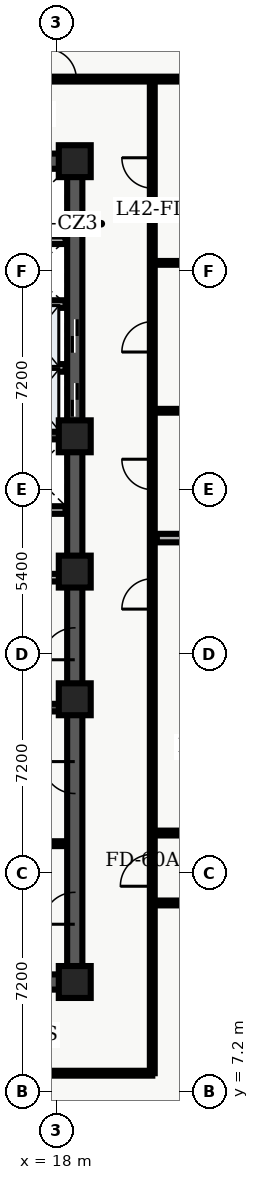
"""IFC4 building model, lengths in metres.
Left out: names, types, materials, properties, quantities, classifications, styles, units other than length and angle.
Written with IfcOpenShell. Run it as: python <this file> out.ifc"""

import sys

from ifc_helpers import new_model, entity, si_unit, converted_unit, direction, frame, origin_with_axes, origin_2d_with_axis, place, context, subcontext, project, spatial, polyline, rectangle, outline, extrude, element, fill, save


model = new_model("IFC4")
c1 = context("Model", 3, precision=1e-05, world=origin_with_axes(), true_north=direction((0.0, 1.0)))
c2 = subcontext(c1, "Body", "Model", "MODEL_VIEW")
j1 = project(units=[si_unit("LENGTHUNIT", "METRE"), converted_unit("PLANEANGLEUNIT", "DEGREE", entity("IfcPlaneAngleMeasure", 0.017), si_unit("PLANEANGLEUNIT", "RADIAN"), dimensions=[0, 0, 0, 0, 0, 0, 0])], contexts=[c1])
p1 = place(None, origin_with_axes())
s1 = spatial("IfcSite", under=j1, at=p1, CompositionType="ELEMENT")
p2 = place(p1, origin_with_axes())
s2 = spatial("IfcBuilding", under=s1, at=p2, CompositionType="ELEMENT")
p3 = place(p2, frame((0.0, 0.0, 171.9), z_axis=(0.0, 0.0, 1.0), x_axis=(1.0, 0.0, 0.0)))
s3 = spatial("IfcBuildingStorey", under=s2, at=p3, CompositionType="ELEMENT", Elevation=171.9)
p4 = place(p3, frame((11.4, 10.8, 0.0), z_axis=(0.0, 0.0, 1.0), x_axis=(1.0, 0.0, 0.0)))
e1 = element("IfcWall", 1, at=p4, inside=s3, PredefinedType="SHEAR", context=c2, shape_type="SweptSolid", body=[
    extrude(outline(polyline([(0.0, -0.25), (7.2, -0.25), (7.2, 0.25), (0.0, 0.25), (0.0, -0.25)])), origin_with_axes(), (0.0, 0.0, 1.0), 3.66),
])
p5 = place(p4, frame((2.625, 0.0, 0.0), z_axis=(0.0, 0.0, 1.0), x_axis=(1.0, 0.0, 0.0)))
e2 = element("IfcOpeningElement", 2, at=p5, cuts=e1, PredefinedType="OPENING", context=c2, shape_type="SweptSolid", body=[
    extrude(rectangle(XDim=1.05, YDim=0.52, at=origin_2d_with_axis()), origin_with_axes(), (0.0, 0.0, 1.0), 2.15),
])
p6 = place(p3, frame((11.4, 37.8, 0.0), z_axis=(0.0, 0.0, 1.0), x_axis=(1.0, 0.0, 0.0)))
e3 = element("IfcWall", 3, at=p6, inside=s3, PredefinedType="SHEAR", context=c2, shape_type="SweptSolid", body=[
    extrude(outline(polyline([(0.0, -0.25), (7.2, -0.25), (7.2, 0.25), (0.0, 0.25), (0.0, -0.25)])), origin_with_axes(), (0.0, 0.0, 1.0), 3.66),
])
p7 = place(p6, frame((2.625, 0.0, 0.0), z_axis=(0.0, 0.0, 1.0), x_axis=(1.0, 0.0, 0.0)))
e4 = element("IfcOpeningElement", 4, at=p7, cuts=e3, PredefinedType="OPENING", context=c2, shape_type="SweptSolid", body=[
    extrude(rectangle(XDim=1.05, YDim=0.52, at=origin_2d_with_axis()), origin_with_axes(), (0.0, 0.0, 1.0), 2.15),
])
p8 = place(p3, frame((18.6, 10.8, 0.0), z_axis=(0.0, 0.0, 1.0), x_axis=(0.0, 1.0, 0.0)))
e5 = element("IfcWall", 5, at=p8, inside=s3, PredefinedType="SHEAR", context=c2, shape_type="SweptSolid", body=[
    extrude(outline(polyline([(0.0, -0.25), (13.5, -0.25), (13.5, 0.25), (0.0, 0.25), (0.0, -0.25)])), origin_with_axes(), (0.0, 0.0, 1.0), 3.66),
])
p9 = place(p8, frame((11.125, 0.0, 0.0), z_axis=(0.0, 0.0, 1.0), x_axis=(1.0, 0.0, 0.0)))
e6 = element("IfcOpeningElement", 6, at=p9, cuts=e5, PredefinedType="OPENING", context=c2, shape_type="SweptSolid", body=[
    extrude(rectangle(XDim=1.05, YDim=0.52, at=origin_2d_with_axis()), origin_with_axes(), (0.0, 0.0, 1.0), 2.15),
])
p10 = place(p8, frame((2.425, 0.0, 0.0), z_axis=(0.0, 0.0, 1.0), x_axis=(1.0, 0.0, 0.0)))
e7 = element("IfcOpeningElement", 7, at=p10, cuts=e5, PredefinedType="OPENING", context=c2, shape_type="SweptSolid", body=[
    extrude(rectangle(XDim=1.05, YDim=0.52, at=origin_2d_with_axis()), origin_with_axes(), (0.0, 0.0, 1.0), 2.15),
])
p11 = place(p8, frame((6.725, 0.0, 0.0), z_axis=(0.0, 0.0, 1.0), x_axis=(1.0, 0.0, 0.0)))
e8 = element("IfcOpeningElement", 8, at=p11, cuts=e5, PredefinedType="OPENING", context=c2, shape_type="SweptSolid", body=[
    extrude(rectangle(XDim=1.05, YDim=0.52, at=origin_2d_with_axis()), origin_with_axes(), (0.0, 0.0, 1.0), 2.15),
])
p12 = place(p3, frame((18.6, 24.3, 0.0), z_axis=(0.0, 0.0, 1.0), x_axis=(0.0, 1.0, 0.0)))
e9 = element("IfcWall", 9, at=p12, inside=s3, PredefinedType="SHEAR", context=c2, shape_type="SweptSolid", body=[
    extrude(outline(polyline([(0.0, -0.25), (13.5, -0.25), (13.5, 0.25), (0.0, 0.25), (0.0, -0.25)])), origin_with_axes(), (0.0, 0.0, 1.0), 3.66),
])
p13 = place(p12, frame((5.65, 0.0, 0.0), z_axis=(0.0, 0.0, 1.0), x_axis=(1.0, 0.0, 0.0)))
e10 = element("IfcOpeningElement", 10, at=p13, cuts=e9, PredefinedType="OPENING", context=c2, shape_type="SweptSolid", body=[
    extrude(rectangle(XDim=1.1, YDim=0.52, at=origin_2d_with_axis()), origin_with_axes(), (0.0, 0.0, 1.0), 2.15),
])
p14 = place(p12, frame((7.75, 0.0, 0.0), z_axis=(0.0, 0.0, 1.0), x_axis=(1.0, 0.0, 0.0)))
e11 = element("IfcOpeningElement", 11, at=p14, cuts=e9, PredefinedType="OPENING", context=c2, shape_type="SweptSolid", body=[
    extrude(rectangle(XDim=1.1, YDim=0.52, at=origin_2d_with_axis()), origin_with_axes(), (0.0, 0.0, 1.0), 2.15),
])
for number, where, z_axis, x_axis in (
    (12, (11.65, 19.825, 0.0), (0.0, 0.0, 1.0), (1.0, 0.0, 0.0)),
    (13, (11.65, 28.775, 0.0), (0.0, 0.0, 1.0), (1.0, 0.0, 0.0)),
):
    element("IfcWall", number, at=place(p3, frame(where, z_axis=z_axis, x_axis=x_axis)), inside=s3, PredefinedType="SHEAR", context=c2, shape_type="SweptSolid", body=[
        extrude(outline(polyline([(0.0, -0.125), (6.7, -0.125), (6.7, 0.125), (0.0, 0.125), (0.0, -0.125)])), origin_with_axes(), (0.0, 0.0, 1.0), 3.66),
    ])
p15 = place(p3, frame((11.7, 24.1, 0.0), z_axis=(0.0, 0.0, 1.0), x_axis=(1.0, 0.0, 0.0)))
e14 = element("IfcWall", 14, at=p15, inside=s3, PredefinedType="SOLIDWALL", context=c2, shape_type="SweptSolid", body=[
    extrude(outline(polyline([(0.0, -0.125), (6.6, -0.125), (6.6, 0.125), (0.0, 0.125), (0.0, -0.125)])), origin_with_axes(), (0.0, 0.0, 1.0), 2.7),
])
p16 = place(p15, frame((3.6, 0.0, 0.0), z_axis=(0.0, 0.0, 1.0), x_axis=(1.0, 0.0, 0.0)))
e15 = element("IfcOpeningElement", 15, at=p16, cuts=e14, PredefinedType="OPENING", context=c2, shape_type="SweptSolid", body=[
    extrude(rectangle(XDim=0.9, YDim=0.27, at=origin_2d_with_axis()), origin_with_axes(), (0.0, 0.0, 1.0), 2.15),
])
p17 = place(p15, frame((5.65, 0.0, 0.0), z_axis=(0.0, 0.0, 1.0), x_axis=(1.0, 0.0, 0.0)))
e16 = element("IfcOpeningElement", 16, at=p17, cuts=e14, PredefinedType="OPENING", context=c2, shape_type="SweptSolid", body=[
    extrude(rectangle(XDim=0.9, YDim=0.27, at=origin_2d_with_axis()), origin_with_axes(), (0.0, 0.0, 1.0), 2.15),
])
p18 = place(p3, frame((11.7, 26.325, 0.0), z_axis=(0.0, 0.0, 1.0), x_axis=(1.0, 0.0, 0.0)))
e17 = element("IfcWall", 17, at=p18, inside=s3, PredefinedType="SOLIDWALL", context=c2, shape_type="SweptSolid", body=[
    extrude(outline(polyline([(0.0, -0.125), (6.6, -0.125), (6.6, 0.125), (0.0, 0.125), (0.0, -0.125)])), origin_with_axes(), (0.0, 0.0, 1.0), 2.7),
])
p19 = place(p18, frame((3.5, 0.0, 0.0), z_axis=(0.0, 0.0, 1.0), x_axis=(1.0, 0.0, 0.0)))
e18 = element("IfcOpeningElement", 18, at=p19, cuts=e17, PredefinedType="OPENING", context=c2, shape_type="SweptSolid", body=[
    extrude(rectangle(XDim=0.9, YDim=0.27, at=origin_2d_with_axis()), origin_with_axes(), (0.0, 0.0, 1.0), 2.15),
])
for number, where, z_axis, x_axis in (
    (19, (18.6, 10.8, 0.0), (0.0, 0.0, 1.0), (1.0, 0.0, 0.0)),
    (20, (18.6, 20.1, 0.0), (0.0, 0.0, 1.0), (1.0, 0.0, 0.0)),
    (21, (18.6, 24.3, 0.0), (0.0, 0.0, 1.0), (1.0, 0.0, 0.0)),
    (22, (18.6, 28.75, 0.0), (0.0, 0.0, 1.0), (1.0, 0.0, 0.0)),
    (23, (18.6, 37.8, 0.0), (0.0, 0.0, 1.0), (1.0, 0.0, 0.0)),
):
    element("IfcColumn", number, at=place(p3, frame(where, z_axis=z_axis, x_axis=x_axis)), inside=s3, PredefinedType="COLUMN", context=c2, shape_type="SweptSolid", body=[
        extrude(rectangle(XDim=1.05, YDim=1.05, at=origin_2d_with_axis()), origin_with_axes(), (0.0, 0.0, 1.0), 3.9),
    ])
p20 = place(p3, frame((15.84, 15.35, 0.0), z_axis=(0.0, 0.0, 1.0), x_axis=(1.0, 0.0, 0.0)))
e24 = element("IfcWall", 24, at=p20, inside=s3, PredefinedType="PARTITIONING", context=c2, shape_type="SweptSolid", body=[
    extrude(outline(polyline([(0.0, -0.08), (2.46, -0.08), (2.46, 0.08), (0.0, 0.08), (0.0, -0.08)])), origin_with_axes(), (0.0, 0.0, 1.0), 2.7),
])
for number, where, z_axis, x_axis in (
    (25, (15.84, 31.0, 0.0), (0.0, 0.0, 1.0), (1.0, 0.0, 0.0)),
    (26, (15.84, 33.1, 0.0), (0.0, 0.0, 1.0), (1.0, 0.0, 0.0)),
    (27, (15.84, 35.2, 0.0), (0.0, 0.0, 1.0), (1.0, 0.0, 0.0)),
):
    element("IfcWall", number, at=place(p3, frame(where, z_axis=z_axis, x_axis=x_axis)), inside=s3, PredefinedType="SOLIDWALL", context=c2, shape_type="SweptSolid", body=[
        extrude(outline(polyline([(0.0, -0.125), (2.46, -0.125), (2.46, 0.125), (0.0, 0.125), (0.0, -0.125)])), origin_with_axes(), (0.0, 0.0, 1.0), 2.7),
    ])
p21 = place(p3, frame((2.6, 7.8, 0.0), z_axis=(0.0, 0.0, 1.0), x_axis=(1.0, 0.0, 0.0)))
e28 = element("IfcWall", 28, at=p21, inside=s3, PredefinedType="PARTITIONING", context=c2, shape_type="SweptSolid", body=[
    extrude(outline(polyline([(0.0, -0.08), (18.55, -0.08), (18.55, 0.08), (0.0, 0.08), (0.0, -0.08)])), origin_with_axes(), (0.0, 0.0, 1.0), 2.7),
])
p22 = place(p21, frame((9.245, 0.0, 0.0), z_axis=(0.0, 0.0, 1.0), x_axis=(1.0, 0.0, 0.0)))
e29 = element("IfcOpeningElement", 29, at=p22, cuts=e28, PredefinedType="OPENING", context=c2, shape_type="SweptSolid", body=[
    extrude(rectangle(XDim=1.0, YDim=0.18, at=origin_2d_with_axis()), origin_with_axes(), (0.0, 0.0, 1.0), 2.15),
])
p23 = place(p3, frame((2.6, 40.5, 0.0), z_axis=(0.0, 0.0, 1.0), x_axis=(1.0, 0.0, 0.0)))
e30 = element("IfcWall", 30, at=p23, inside=s3, PredefinedType="PARTITIONING", context=c2, shape_type="SweptSolid", body=[
    extrude(outline(polyline([(0.0, -0.08), (21.803, -0.08), (21.803, 0.08), (0.0, 0.08), (0.0, -0.08)])), origin_with_axes(), (0.0, 0.0, 1.0), 2.7),
])
p24 = place(p23, frame((3.13, 0.0, 0.0), z_axis=(0.0, 0.0, 1.0), x_axis=(1.0, 0.0, 0.0)))
e31 = element("IfcOpeningElement", 31, at=p24, cuts=e30, PredefinedType="OPENING", context=c2, shape_type="SweptSolid", body=[
    extrude(rectangle(XDim=1.0, YDim=0.18, at=origin_2d_with_axis()), origin_with_axes(), (0.0, 0.0, 1.0), 2.15),
])
p25 = place(p23, frame((8.277, 0.0, 0.0), z_axis=(0.0, 0.0, 1.0), x_axis=(1.0, 0.0, 0.0)))
e32 = element("IfcOpeningElement", 32, at=p25, cuts=e30, PredefinedType="OPENING", context=c2, shape_type="SweptSolid", body=[
    extrude(rectangle(XDim=1.2, YDim=0.18, at=origin_2d_with_axis()), origin_with_axes(), (0.0, 0.0, 1.0), 2.2),
])
p26 = place(p23, frame((15.553, 0.0, 0.0), z_axis=(0.0, 0.0, 1.0), x_axis=(1.0, 0.0, 0.0)))
e33 = element("IfcOpeningElement", 33, at=p26, cuts=e30, PredefinedType="OPENING", context=c2, shape_type="SweptSolid", body=[
    extrude(rectangle(XDim=1.0, YDim=0.18, at=origin_2d_with_axis()), origin_with_axes(), (0.0, 0.0, 1.0), 2.15),
])
p27 = place(p3, frame((21.15, 7.8, 0.0), z_axis=(0.0, 0.0, 1.0), x_axis=(0.0, 1.0, 0.0)))
e34 = element("IfcWall", 34, at=p27, inside=s3, PredefinedType="PARTITIONING", context=c2, shape_type="SweptSolid", body=[
    extrude(outline(polyline([(0.0, -0.08), (32.7, -0.08), (32.7, 0.08), (0.0, 0.08), (0.0, -0.08)])), origin_with_axes(), (0.0, 0.0, 1.0), 2.7),
])
p28 = place(p27, frame((15.766, 0.0, 0.0), z_axis=(0.0, 0.0, 1.0), x_axis=(1.0, 0.0, 0.0)))
e35 = element("IfcOpeningElement", 35, at=p28, cuts=e34, PredefinedType="OPENING", context=c2, shape_type="SweptSolid", body=[
    extrude(rectangle(XDim=1.0, YDim=0.18, at=origin_2d_with_axis()), origin_with_axes(), (0.0, 0.0, 1.0), 2.15),
])
p29 = place(p27, frame((19.696, 0.0, 0.0), z_axis=(0.0, 0.0, 1.0), x_axis=(1.0, 0.0, 0.0)))
e36 = element("IfcOpeningElement", 36, at=p29, cuts=e34, PredefinedType="OPENING", context=c2, shape_type="SweptSolid", body=[
    extrude(rectangle(XDim=1.0, YDim=0.18, at=origin_2d_with_axis()), origin_with_axes(), (0.0, 0.0, 1.0), 2.15),
])
p30 = place(p27, frame((24.223, 0.0, 0.0), z_axis=(0.0, 0.0, 1.0), x_axis=(1.0, 0.0, 0.0)))
e37 = element("IfcOpeningElement", 37, at=p30, cuts=e34, PredefinedType="OPENING", context=c2, shape_type="SweptSolid", body=[
    extrude(rectangle(XDim=1.0, YDim=0.18, at=origin_2d_with_axis()), origin_with_axes(), (0.0, 0.0, 1.0), 2.15),
])
p31 = place(p27, frame((29.613, 0.0, 0.0), z_axis=(0.0, 0.0, 1.0), x_axis=(1.0, 0.0, 0.0)))
e38 = element("IfcOpeningElement", 38, at=p31, cuts=e34, PredefinedType="OPENING", context=c2, shape_type="SweptSolid", body=[
    extrude(rectangle(XDim=1.0, YDim=0.18, at=origin_2d_with_axis()), origin_with_axes(), (0.0, 0.0, 1.0), 2.15),
])
p32 = place(p27, frame((6.675, 0.0, 0.0), z_axis=(0.0, 0.0, 1.0), x_axis=(1.0, 0.0, 0.0)))
e39 = element("IfcOpeningElement", 39, at=p32, cuts=e34, PredefinedType="OPENING", context=c2, shape_type="SweptSolid", body=[
    extrude(rectangle(XDim=1.05, YDim=0.18, at=origin_2d_with_axis()), origin_with_axes(), (0.0, 0.0, 1.0), 2.15),
])
p33 = place(p3, frame((21.3, 25.402, 0.0), z_axis=(0.0, 0.0, 1.0), x_axis=(1.0, 0.0, 0.0)))
e40 = element("IfcWall", 40, at=p33, inside=s3, PredefinedType="PARTITIONING", context=c2, shape_type="SweptSolid", body=[
    extrude(outline(polyline([(0.0, -0.14), (3.103, -0.14), (3.103, 0.14), (0.0, 0.14), (0.0, -0.14)])), origin_with_axes(), (0.0, 0.0, 1.0), 2.7),
])
for number, where, z_axis, x_axis in (
    (41, (21.3, 29.59, 0.0), (0.0, 0.0, 1.0), (1.0, 0.0, 0.0)),
    (42, (21.3, 34.455, 0.0), (0.0, 0.0, 1.0), (1.0, 0.0, 0.0)),
):
    element("IfcWall", number, at=place(p3, frame(where, z_axis=z_axis, x_axis=x_axis)), inside=s3, PredefinedType="PARTITIONING", context=c2, shape_type="SweptSolid", body=[
        extrude(outline(polyline([(0.0, -0.062), (3.103, -0.062), (3.103, 0.062), (0.0, 0.062), (0.0, -0.062)])), origin_with_axes(), (0.0, 0.0, 1.0), 2.7),
    ])
p34 = place(p3, frame((21.15, 13.4, 0.0), z_axis=(0.0, 0.0, 1.0), x_axis=(1.0, 0.0, 0.0)))
e43 = element("IfcWall", 43, at=p34, inside=s3, PredefinedType="PARTITIONING", context=c2, shape_type="SweptSolid", body=[
    extrude(outline(polyline([(0.0, -0.08), (15.2, -0.08), (15.2, 0.08), (0.0, 0.08), (0.0, -0.08)])), origin_with_axes(), (0.0, 0.0, 1.0), 2.7),
])
p35 = place(p34, frame((7.65, 0.0, 0.0), z_axis=(0.0, 0.0, 1.0), x_axis=(1.0, 0.0, 0.0)))
e44 = element("IfcOpeningElement", 44, at=p35, cuts=e43, PredefinedType="OPENING", context=c2, shape_type="SweptSolid", body=[
    extrude(rectangle(XDim=1.2, YDim=0.18, at=origin_2d_with_axis()), origin_with_axes(), (0.0, 0.0, 1.0), 2.2),
])
p36 = place(p3, frame((21.15, 15.7, 0.0), z_axis=(0.0, 0.0, 1.0), x_axis=(1.0, 0.0, 0.0)))
e45 = element("IfcWall", 45, at=p36, inside=s3, PredefinedType="PARTITIONING", context=c2, shape_type="SweptSolid", body=[
    extrude(outline(polyline([(0.0, -0.08), (15.2, -0.08), (15.2, 0.08), (0.0, 0.08), (0.0, -0.08)])), origin_with_axes(), (0.0, 0.0, 1.0), 2.7),
])
p37 = place(p36, frame((2.275, 0.0, 0.0), z_axis=(0.0, 0.0, 1.0), x_axis=(1.0, 0.0, 0.0)))
e46 = element("IfcOpeningElement", 46, at=p37, cuts=e45, PredefinedType="OPENING", context=c2, shape_type="SweptSolid", body=[
    extrude(rectangle(XDim=1.0, YDim=0.18, at=origin_2d_with_axis()), origin_with_axes(), (0.0, 0.0, 1.0), 2.15),
])
p38 = place(p36, frame((6.768, 0.0, 0.0), z_axis=(0.0, 0.0, 1.0), x_axis=(1.0, 0.0, 0.0)))
e47 = element("IfcOpeningElement", 47, at=p38, cuts=e45, PredefinedType="OPENING", context=c2, shape_type="SweptSolid", body=[
    extrude(rectangle(XDim=1.0, YDim=0.18, at=origin_2d_with_axis()), origin_with_axes(), (0.0, 0.0, 1.0), 2.15),
])
p39 = place(p36, frame((12.143, 0.0, 0.0), z_axis=(0.0, 0.0, 1.0), x_axis=(1.0, 0.0, 0.0)))
e48 = element("IfcOpeningElement", 48, at=p39, cuts=e45, PredefinedType="OPENING", context=c2, shape_type="SweptSolid", body=[
    extrude(rectangle(XDim=1.0, YDim=0.18, at=origin_2d_with_axis()), origin_with_axes(), (0.0, 0.0, 1.0), 2.15),
])
p40 = place(p12, frame((5.65, 0.0, 0.0), z_axis=(0.0, 0.0, 1.0), x_axis=(1.0, 0.0, 0.0)))
e49 = element("IfcDoor", 49, at=p40, inside=s3, OperationType="SLIDING_TO_LEFT", PredefinedType="DOOR", context=c2, shape_type="SweptSolid", body=[
    extrude(rectangle(XDim=1.1, YDim=0.09, at=origin_2d_with_axis()), origin_with_axes(), (0.0, 0.0, 1.0), 2.15),
])
fill(e10, e49)
p41 = place(p12, frame((7.75, 0.0, 0.0), z_axis=(0.0, 0.0, 1.0), x_axis=(1.0, 0.0, 0.0)))
e50 = element("IfcDoor", 50, at=p41, inside=s3, OperationType="SLIDING_TO_RIGHT", PredefinedType="DOOR", context=c2, shape_type="SweptSolid", body=[
    extrude(rectangle(XDim=1.1, YDim=0.09, at=origin_2d_with_axis()), origin_with_axes(), (0.0, 0.0, 1.0), 2.15),
])
fill(e11, e50)
p42 = place(p8, frame((11.125, 0.0, 0.0), z_axis=(0.0, 0.0, 1.0), x_axis=(1.0, 0.0, 0.0)))
e51 = element("IfcDoor", 51, at=p42, inside=s3, OperationType="SINGLE_SWING_LEFT", PredefinedType="DOOR", context=c2, shape_type="SweptSolid", body=[
    extrude(rectangle(XDim=1.05, YDim=0.09, at=origin_2d_with_axis()), origin_with_axes(), (0.0, 0.0, 1.0), 2.15),
])
fill(e6, e51)
p43 = place(p8, frame((2.425, 0.0, 0.0), z_axis=(0.0, 0.0, 1.0), x_axis=(1.0, 0.0, 0.0)))
e52 = element("IfcDoor", 52, at=p43, inside=s3, OperationType="SINGLE_SWING_LEFT", PredefinedType="DOOR", context=c2, shape_type="SweptSolid", body=[
    extrude(rectangle(XDim=1.05, YDim=0.09, at=origin_2d_with_axis()), origin_with_axes(), (0.0, 0.0, 1.0), 2.15),
])
fill(e7, e52)
p44 = place(p8, frame((6.725, 0.0, 0.0), z_axis=(0.0, 0.0, 1.0), x_axis=(1.0, 0.0, 0.0)))
e53 = element("IfcDoor", 53, at=p44, inside=s3, OperationType="SINGLE_SWING_RIGHT", PredefinedType="DOOR", context=c2, shape_type="SweptSolid", body=[
    extrude(rectangle(XDim=1.05, YDim=0.09, at=origin_2d_with_axis()), origin_with_axes(), (0.0, 0.0, 1.0), 2.15),
])
fill(e8, e53)
p45 = place(p23, frame((15.553, 0.0, 0.0), z_axis=(0.0, 0.0, 1.0), x_axis=(1.0, 0.0, 0.0)))
e54 = element("IfcDoor", 54, at=p45, inside=s3, OperationType="SINGLE_SWING_LEFT", PredefinedType="DOOR", context=c2, shape_type="SweptSolid", body=[
    extrude(rectangle(XDim=1.0, YDim=0.09, at=origin_2d_with_axis()), origin_with_axes(), (0.0, 0.0, 1.0), 2.15),
])
fill(e33, e54)
p46 = place(p27, frame((15.766, 0.0, 0.0), z_axis=(0.0, 0.0, 1.0), x_axis=(1.0, 0.0, 0.0)))
e55 = element("IfcDoor", 55, at=p46, inside=s3, OperationType="SINGLE_SWING_LEFT", PredefinedType="DOOR", context=c2, shape_type="SweptSolid", body=[
    extrude(rectangle(XDim=1.0, YDim=0.09, at=origin_2d_with_axis()), origin_with_axes(), (0.0, 0.0, 1.0), 2.15),
])
fill(e35, e55)
p47 = place(p27, frame((19.696, 0.0, 0.0), z_axis=(0.0, 0.0, 1.0), x_axis=(1.0, 0.0, 0.0)))
e56 = element("IfcDoor", 56, at=p47, inside=s3, OperationType="SINGLE_SWING_RIGHT", PredefinedType="DOOR", context=c2, shape_type="SweptSolid", body=[
    extrude(rectangle(XDim=1.0, YDim=0.09, at=origin_2d_with_axis()), origin_with_axes(), (0.0, 0.0, 1.0), 2.15),
])
fill(e36, e56)
p48 = place(p27, frame((24.223, 0.0, 0.0), z_axis=(0.0, 0.0, 1.0), x_axis=(1.0, 0.0, 0.0)))
e57 = element("IfcDoor", 57, at=p48, inside=s3, OperationType="SINGLE_SWING_LEFT", PredefinedType="DOOR", context=c2, shape_type="SweptSolid", body=[
    extrude(rectangle(XDim=1.0, YDim=0.09, at=origin_2d_with_axis()), origin_with_axes(), (0.0, 0.0, 1.0), 2.15),
])
fill(e37, e57)
p49 = place(p27, frame((29.613, 0.0, 0.0), z_axis=(0.0, 0.0, 1.0), x_axis=(1.0, 0.0, 0.0)))
e58 = element("IfcDoor", 58, at=p49, inside=s3, OperationType="SINGLE_SWING_RIGHT", PredefinedType="DOOR", context=c2, shape_type="SweptSolid", body=[
    extrude(rectangle(XDim=1.0, YDim=0.09, at=origin_2d_with_axis()), origin_with_axes(), (0.0, 0.0, 1.0), 2.15),
])
fill(e38, e58)
p50 = place(p27, frame((6.675, 0.0, 0.0), z_axis=(0.0, 0.0, 1.0), x_axis=(1.0, 0.0, 0.0)))
e59 = element("IfcDoor", 59, at=p50, inside=s3, OperationType="SINGLE_SWING_LEFT", PredefinedType="DOOR", context=c2, shape_type="SweptSolid", body=[
    extrude(rectangle(XDim=1.05, YDim=0.09, at=origin_2d_with_axis()), origin_with_axes(), (0.0, 0.0, 1.0), 2.15),
])
fill(e39, e59)
save(model, sys.argv[1])
